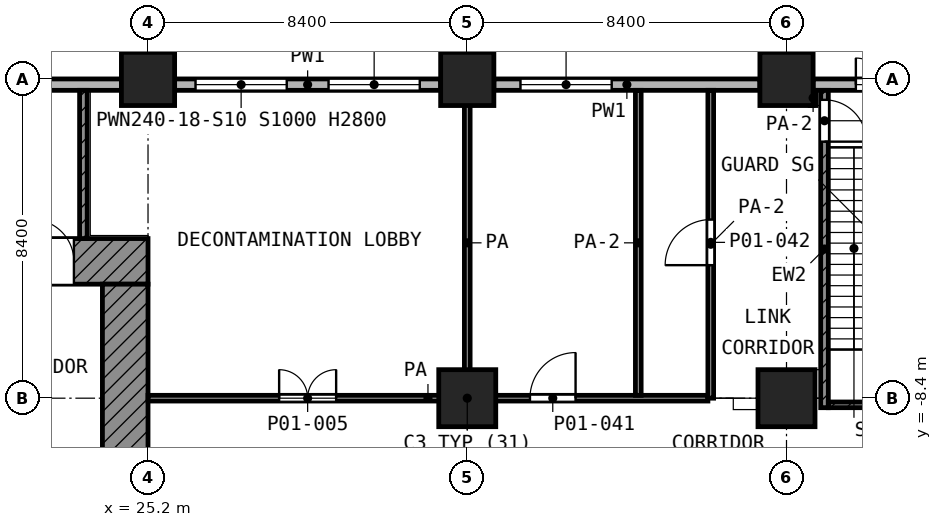
"""IFC4 building model, lengths in metres.
Left out: names, types, materials, properties, quantities, classifications, styles, units other than length and angle.
Written with IfcOpenShell. Run it as: python <this file> out.ifc"""

import sys

from ifc_helpers import new_model, si_unit, direction, frame, frame_2d, origin, origin_2d, place, context, subcontext, project, spatial, rectangle, extrude, element, fill, save


model = new_model("IFC4")
c1 = context("Model", 3, precision=1e-05, world=origin(), true_north=direction((0.0, 1.0)))
c2 = subcontext(c1, "Body", "Model", "MODEL_VIEW")
j1 = project(units=[si_unit("LENGTHUNIT", "METRE"), si_unit("PLANEANGLEUNIT", "RADIAN")], contexts=[c1])
p1 = place(None, origin())
s1 = spatial("IfcSite", under=j1, at=p1, CompositionType="ELEMENT")
p2 = place(p1, origin())
s2 = spatial("IfcBuilding", under=s1, at=p2, CompositionType="ELEMENT")
p3 = place(p2, origin())
s3 = spatial("IfcBuildingStorey", under=s2, at=p3, CompositionType="ELEMENT", Elevation=0.0)
for number, where, z_axis, x_axis in (
    (1, (25.2, 0.0, 0.0), (0.0, 0.0, 1.0), (1.0, 0.0, 0.0)),
    (2, (33.6, 0.0, 0.0), (0.0, 0.0, 1.0), (1.0, 0.0, 0.0)),
    (3, (42.0, 0.0, 0.0), (0.0, 0.0, 1.0), (1.0, 0.0, 0.0)),
):
    element("IfcColumn", number, at=place(p3, frame(where, z_axis=z_axis, x_axis=x_axis)), inside=s3, PredefinedType="COLUMN", context=c2, shape_type="SweptSolid", body=[
        extrude(rectangle(XDim=1.4, YDim=1.4, at=origin_2d()), origin(), (0.0, 0.0, 1.0), 7.0),
    ])
for number, where, z_axis, x_axis in (
    (4, (33.6, -8.4, 0.0), (0.0, 0.0, 1.0), (1.0, 0.0, 0.0)),
    (5, (42.0, -8.4, 0.0), (0.0, 0.0, 1.0), (1.0, 0.0, 0.0)),
):
    element("IfcColumn", number, at=place(p3, frame(where, z_axis=z_axis, x_axis=x_axis)), inside=s3, PredefinedType="COLUMN", context=c2, shape_type="SweptSolid", body=[
        extrude(rectangle(XDim=1.5, YDim=1.5, at=origin_2d()), origin(), (0.0, 0.0, 1.0), 7.0),
    ])
p4 = place(p3, frame((49.7, -0.15, 0.0), z_axis=(0.0, 0.0, 1.0), x_axis=(-1.0, 0.0, 0.0)))
e6 = element("IfcWall", 6, at=p4, inside=s3, PredefinedType="SOLIDWALL", context=c2, shape_type="SweptSolid", body=[
    extrude(rectangle(XDim=7.0, YDim=0.3, at=frame_2d((3.5, 0.0))), origin(), (0.0, 0.0, 1.0), 5.25),
])
p5 = place(p4, frame((4.475, 0.0, 0.0)))
e7 = element("IfcOpeningElement", 7, at=p5, cuts=e6, PredefinedType="OPENING", context=c2, shape_type="SweptSolid", body=[
    extrude(rectangle(XDim=1.4, YDim=2.1, at=frame_2d((0.7, 1.05))), frame((0.0, 0.16, 0.0), z_axis=(0.0, -1.0, 0.0), x_axis=(1.0, 0.0, 0.0)), (0.0, 0.0, 1.0), 0.32),
])
p6 = place(p3, frame((41.3, -0.15, 0.0), z_axis=(0.0, 0.0, 1.0), x_axis=(-1.0, 0.0, 0.0)))
e8 = element("IfcWall", 8, at=p6, inside=s3, PredefinedType="SOLIDWALL", context=c2, shape_type="SweptSolid", body=[
    extrude(rectangle(XDim=7.0, YDim=0.3, at=frame_2d((3.5, 0.0))), origin(), (0.0, 0.0, 1.0), 5.25),
])
p7 = place(p6, frame((3.9, 0.0, 1.0)))
e9 = element("IfcOpeningElement", 9, at=p7, cuts=e8, PredefinedType="OPENING", context=c2, shape_type="SweptSolid", body=[
    extrude(rectangle(XDim=2.4, YDim=1.8, at=frame_2d((1.2, 0.9))), frame((0.0, 0.16, 0.0), z_axis=(0.0, -1.0, 0.0), x_axis=(1.0, 0.0, 0.0)), (0.0, 0.0, 1.0), 0.32),
])
p8 = place(p3, frame((32.9, -0.15, 0.0), z_axis=(0.0, 0.0, 1.0), x_axis=(-1.0, 0.0, 0.0)))
e10 = element("IfcWall", 10, at=p8, inside=s3, PredefinedType="SOLIDWALL", context=c2, shape_type="SweptSolid", body=[
    extrude(rectangle(XDim=7.0, YDim=0.3, at=frame_2d((3.5, 0.0))), origin(), (0.0, 0.0, 1.0), 5.25),
])
p9 = place(p8, frame((0.55, 0.0, 1.0)))
e11 = element("IfcOpeningElement", 11, at=p9, cuts=e10, PredefinedType="OPENING", context=c2, shape_type="SweptSolid", body=[
    extrude(rectangle(XDim=2.4, YDim=1.8, at=frame_2d((1.2, 0.9))), frame((0.0, 0.16, 0.0), z_axis=(0.0, -1.0, 0.0), x_axis=(1.0, 0.0, 0.0)), (0.0, 0.0, 1.0), 0.32),
])
p10 = place(p8, frame((4.05, 0.0, 1.0)))
e12 = element("IfcOpeningElement", 12, at=p10, cuts=e10, PredefinedType="OPENING", context=c2, shape_type="SweptSolid", body=[
    extrude(rectangle(XDim=2.4, YDim=1.8, at=frame_2d((1.2, 0.9))), frame((0.0, 0.16, 0.0), z_axis=(0.0, -1.0, 0.0), x_axis=(1.0, 0.0, 0.0)), (0.0, 0.0, 1.0), 0.32),
])
p11 = place(p3, frame((24.5, -0.15, 0.0), z_axis=(0.0, 0.0, 1.0), x_axis=(-1.0, 0.0, 0.0)))
e13 = element("IfcWall", 13, at=p11, inside=s3, PredefinedType="SOLIDWALL", context=c2, shape_type="SweptSolid", body=[
    extrude(rectangle(XDim=7.0, YDim=0.3, at=frame_2d((3.5, 0.0))), origin(), (0.0, 0.0, 1.0), 5.25),
])
p12 = place(p11, frame((4.425, 0.0, 0.0)))
e14 = element("IfcOpeningElement", 14, at=p12, cuts=e13, PredefinedType="OPENING", context=c2, shape_type="SweptSolid", body=[
    extrude(rectangle(XDim=1.4, YDim=2.1, at=frame_2d((0.7, 1.05))), frame((0.0, 0.16, 0.0), z_axis=(0.0, -1.0, 0.0), x_axis=(1.0, 0.0, 0.0)), (0.0, 0.0, 1.0), 0.32),
])
p13 = place(p3, frame((4.2, -4.8, 0.0), z_axis=(0.0, 0.0, 1.0), x_axis=(1.0, 0.0, 0.0)))
e15 = element("IfcWall", 15, at=p13, inside=s3, PredefinedType="SHEAR", context=c2, shape_type="SweptSolid", body=[
    extrude(rectangle(XDim=21.0, YDim=1.2, at=frame_2d((10.5, 0.0))), origin(), (0.0, 0.0, 1.0), 6.65),
])
p14 = place(p13, frame((1.95, 0.0, 0.0)))
e16 = element("IfcOpeningElement", 16, at=p14, cuts=e15, PredefinedType="OPENING", context=c2, shape_type="SweptSolid", body=[
    extrude(rectangle(XDim=1.1, YDim=2.1, at=frame_2d((0.55, 1.05))), frame((0.0, 0.61, 0.0), z_axis=(0.0, -1.0, 0.0), x_axis=(1.0, 0.0, 0.0)), (0.0, 0.0, 1.0), 1.22),
])
p15 = place(p13, frame((17.95, 0.0, 0.0)))
e17 = element("IfcOpeningElement", 17, at=p15, cuts=e15, PredefinedType="OPENING", context=c2, shape_type="SweptSolid", body=[
    extrude(rectangle(XDim=1.1, YDim=2.1, at=frame_2d((0.55, 1.05))), frame((0.0, 0.61, 0.0), z_axis=(0.0, -1.0, 0.0), x_axis=(1.0, 0.0, 0.0)), (0.0, 0.0, 1.0), 1.22),
])
p16 = place(p3, frame((24.6, -24.0, 0.0), z_axis=(0.0, 0.0, 1.0), x_axis=(0.0, 1.0, 0.0)))
e18 = element("IfcWall", 18, at=p16, inside=s3, PredefinedType="SHEAR", context=c2, shape_type="SweptSolid", body=[
    extrude(rectangle(XDim=18.6, YDim=1.2, at=frame_2d((9.3, 0.0))), origin(), (0.0, 0.0, 1.0), 6.65),
])
p17 = place(p16, frame((10.5, 0.0, 0.0)))
e19 = element("IfcOpeningElement", 19, at=p17, cuts=e18, PredefinedType="OPENING", context=c2, shape_type="SweptSolid", body=[
    extrude(rectangle(XDim=1.8, YDim=2.1, at=frame_2d((0.9, 1.05))), frame((0.0, 0.61, 0.0), z_axis=(0.0, -1.0, 0.0), x_axis=(1.0, 0.0, 0.0)), (0.0, 0.0, 1.0), 1.22),
])
p18 = place(p3, frame((23.5, -4.2, 0.0), z_axis=(0.0, 0.0, 1.0), x_axis=(0.0, 1.0, 0.0)))
e20 = element("IfcWall", 20, at=p18, inside=s3, PredefinedType="SHEAR", context=c2, shape_type="SweptSolid", body=[
    extrude(rectangle(XDim=3.9, YDim=0.2, at=frame_2d((1.95, 0.0))), origin(), (0.0, 0.0, 1.0), 6.65),
])
p19 = place(p3, frame((43.0, -8.65, 0.0), z_axis=(0.0, 0.0, 1.0), x_axis=(0.0, 1.0, 0.0)))
e21 = element("IfcWall", 21, at=p19, inside=s3, PredefinedType="SHEAR", context=c2, shape_type="SweptSolid", body=[
    extrude(rectangle(XDim=8.35, YDim=0.2, at=frame_2d((4.175, 0.0))), origin(), (0.0, 0.0, 1.0), 6.65),
])
p20 = place(p19, frame((7.0, 0.0, 0.0)))
e22 = element("IfcOpeningElement", 22, at=p20, cuts=e21, PredefinedType="OPENING", context=c2, shape_type="SweptSolid", body=[
    extrude(rectangle(XDim=1.1, YDim=2.1, at=frame_2d((0.55, 1.05))), frame((0.0, 0.11, 0.0), z_axis=(0.0, -1.0, 0.0), x_axis=(1.0, 0.0, 0.0)), (0.0, 0.0, 1.0), 0.22),
])
p21 = place(p3, frame((43.1, -8.575, 0.0), z_axis=(0.0, 0.0, 1.0), x_axis=(1.0, 0.0, 0.0)))
e23 = element("IfcWall", 23, at=p21, inside=s3, PredefinedType="SHEAR", context=c2, shape_type="SweptSolid", body=[
    extrude(rectangle(XDim=2.85, YDim=0.15, at=frame_2d((1.425, 0.0))), origin(), (0.0, 0.0, 1.0), 6.65),
])
p22 = place(p3, frame((25.2, -8.4, 0.0), z_axis=(0.0, 0.0, 1.0), x_axis=(1.0, 0.0, 0.0)))
e24 = element("IfcWall", 24, at=p22, inside=s3, PredefinedType="PARTITIONING", context=c2, shape_type="SweptSolid", body=[
    extrude(rectangle(XDim=14.732, YDim=0.15, at=frame_2d((7.366, 0.0))), origin(), (0.0, 0.0, 1.0), 6.65),
])
p23 = place(p22, frame((3.45, 0.0, 0.0)))
e25 = element("IfcOpeningElement", 25, at=p23, cuts=e24, PredefinedType="OPENING", context=c2, shape_type="SweptSolid", body=[
    extrude(rectangle(XDim=1.5, YDim=2.1, at=frame_2d((0.75, 1.05))), frame((0.0, 0.085, 0.0), z_axis=(0.0, -1.0, 0.0), x_axis=(1.0, 0.0, 0.0)), (0.0, 0.0, 1.0), 0.17),
])
p24 = place(p22, frame((10.05, 0.0, 0.0)))
e26 = element("IfcOpeningElement", 26, at=p24, cuts=e24, PredefinedType="OPENING", context=c2, shape_type="SweptSolid", body=[
    extrude(rectangle(XDim=1.2, YDim=2.1, at=frame_2d((0.6, 1.05))), frame((0.0, 0.085, 0.0), z_axis=(0.0, -1.0, 0.0), x_axis=(1.0, 0.0, 0.0)), (0.0, 0.0, 1.0), 0.17),
])
p25 = place(p3, frame((33.6, -8.325, 0.0), z_axis=(0.0, 0.0, 1.0), x_axis=(0.0, 1.0, 0.0)))
e27 = element("IfcWall", 27, at=p25, inside=s3, PredefinedType="PARTITIONING", context=c2, shape_type="SweptSolid", body=[
    extrude(rectangle(XDim=8.025, YDim=0.15, at=frame_2d((4.012, 0.0))), origin(), (0.0, 0.0, 1.0), 6.65),
])
p26 = place(p3, frame((38.1, -8.325, 0.0), z_axis=(0.0, 0.0, 1.0), x_axis=(0.0, 1.0, 0.0)))
e28 = element("IfcWall", 28, at=p26, inside=s3, PredefinedType="PARTITIONING", context=c2, shape_type="SweptSolid", body=[
    extrude(rectangle(XDim=8.025, YDim=0.15, at=frame_2d((4.012, 0.0))), origin(), (0.0, 0.0, 1.0), 5.25),
])
p27 = place(p3, frame((40.007, -8.4, 0.0), z_axis=(0.0, 0.0, 1.0), x_axis=(0.0, 1.0, 0.0)))
e29 = element("IfcWall", 29, at=p27, inside=s3, PredefinedType="PARTITIONING", context=c2, shape_type="SweptSolid", body=[
    extrude(rectangle(XDim=8.1, YDim=0.15, at=frame_2d((4.05, 0.0))), origin(), (0.0, 0.0, 1.0), 5.25),
])
p28 = place(p27, frame((3.5, 0.0, 0.0)))
e30 = element("IfcOpeningElement", 30, at=p28, cuts=e29, PredefinedType="OPENING", context=c2, shape_type="SweptSolid", body=[
    extrude(rectangle(XDim=1.2, YDim=2.1, at=frame_2d((0.6, 1.05))), frame((0.0, 0.085, 0.0), z_axis=(0.0, -1.0, 0.0), x_axis=(1.0, 0.0, 0.0)), (0.0, 0.0, 1.0), 0.17),
])
p29 = place(p3, frame((42.7, -0.7, 0.0), z_axis=(0.0, 0.0, 1.0), x_axis=(0.0, 1.0, 0.0)))
e31 = element("IfcWall", 31, at=p29, inside=s3, PredefinedType="PARTITIONING", context=c2, shape_type="SweptSolid", body=[
    extrude(rectangle(XDim=0.4, YDim=0.15, at=frame_2d((0.2, 0.0))), origin(), (0.0, 0.0, 1.0), 5.25),
])
p30 = place(p5, frame((1.4, 0.0, 0.0), z_axis=(0.0, 0.0, 1.0), x_axis=(-1.0, 0.0, 0.0)))
e32 = element("IfcDoor", 32, at=p30, inside=s3, OperationType="DOUBLE_DOOR_SINGLE_SWING", PredefinedType="DOOR", context=c2, shape_type="SweptSolid", body=[
    extrude(rectangle(XDim=1.4, YDim=2.1, at=frame_2d((0.7, 1.05))), frame((0.0, 0.025, 0.0), z_axis=(0.0, -1.0, 0.0), x_axis=(1.0, 0.0, 0.0)), (0.0, 0.0, 1.0), 0.05),
])
fill(e7, e32)
p31 = place(p7, origin())
e33 = element("IfcWindow", 33, at=p31, inside=s3, PartitioningType="SINGLE_PANEL", PredefinedType="WINDOW", context=c2, shape_type="SweptSolid", body=[
    extrude(rectangle(XDim=2.4, YDim=1.8, at=frame_2d((1.2, 0.9))), frame((0.0, 0.03, 0.0), z_axis=(0.0, -1.0, 0.0), x_axis=(1.0, 0.0, 0.0)), (0.0, 0.0, 1.0), 0.06),
])
fill(e9, e33)
p32 = place(p9, origin())
e34 = element("IfcWindow", 34, at=p32, inside=s3, PartitioningType="SINGLE_PANEL", PredefinedType="WINDOW", context=c2, shape_type="SweptSolid", body=[
    extrude(rectangle(XDim=2.4, YDim=1.8, at=frame_2d((1.2, 0.9))), frame((0.0, 0.03, 0.0), z_axis=(0.0, -1.0, 0.0), x_axis=(1.0, 0.0, 0.0)), (0.0, 0.0, 1.0), 0.06),
])
fill(e11, e34)
p33 = place(p10, origin())
e35 = element("IfcWindow", 35, at=p33, inside=s3, PartitioningType="SINGLE_PANEL", PredefinedType="WINDOW", context=c2, shape_type="SweptSolid", body=[
    extrude(rectangle(XDim=2.4, YDim=1.8, at=frame_2d((1.2, 0.9))), frame((0.0, 0.03, 0.0), z_axis=(0.0, -1.0, 0.0), x_axis=(1.0, 0.0, 0.0)), (0.0, 0.0, 1.0), 0.06),
])
fill(e12, e35)
p34 = place(p15, origin())
e36 = element("IfcDoor", 36, at=p34, inside=s3, OperationType="SINGLE_SWING_LEFT", PredefinedType="DOOR", context=c2, shape_type="SweptSolid", body=[
    extrude(rectangle(XDim=1.1, YDim=2.1, at=frame_2d((0.55, 1.05))), frame((0.0, 0.025, 0.0), z_axis=(0.0, -1.0, 0.0), x_axis=(1.0, 0.0, 0.0)), (0.0, 0.0, 1.0), 0.05),
])
fill(e17, e36)
p35 = place(p20, frame((1.1, 0.0, 0.0), z_axis=(0.0, 0.0, 1.0), x_axis=(-1.0, 0.0, 0.0)))
e37 = element("IfcDoor", 37, at=p35, inside=s3, OperationType="SINGLE_SWING_LEFT", PredefinedType="DOOR", context=c2, shape_type="SweptSolid", body=[
    extrude(rectangle(XDim=1.1, YDim=2.1, at=frame_2d((0.55, 1.05))), frame((0.0, 0.025, 0.0), z_axis=(0.0, -1.0, 0.0), x_axis=(1.0, 0.0, 0.0)), (0.0, 0.0, 1.0), 0.05),
])
fill(e22, e37)
p36 = place(p23, origin())
e38 = element("IfcDoor", 38, at=p36, inside=s3, OperationType="DOUBLE_DOOR_SINGLE_SWING", PredefinedType="DOOR", context=c2, shape_type="SweptSolid", body=[
    extrude(rectangle(XDim=1.5, YDim=2.1, at=frame_2d((0.75, 1.05))), frame((0.0, 0.025, 0.0), z_axis=(0.0, -1.0, 0.0), x_axis=(1.0, 0.0, 0.0)), (0.0, 0.0, 1.0), 0.05),
])
fill(e25, e38)
p37 = place(p24, origin())
e39 = element("IfcDoor", 39, at=p37, inside=s3, OperationType="SINGLE_SWING_RIGHT", PredefinedType="DOOR", context=c2, shape_type="SweptSolid", body=[
    extrude(rectangle(XDim=1.2, YDim=2.1, at=frame_2d((0.6, 1.05))), frame((0.0, 0.025, 0.0), z_axis=(0.0, -1.0, 0.0), x_axis=(1.0, 0.0, 0.0)), (0.0, 0.0, 1.0), 0.05),
])
fill(e26, e39)
p38 = place(p28, origin())
e40 = element("IfcDoor", 40, at=p38, inside=s3, OperationType="SINGLE_SWING_LEFT", PredefinedType="DOOR", context=c2, shape_type="SweptSolid", body=[
    extrude(rectangle(XDim=1.2, YDim=2.1, at=frame_2d((0.6, 1.05))), frame((0.0, 0.025, 0.0), z_axis=(0.0, -1.0, 0.0), x_axis=(1.0, 0.0, 0.0)), (0.0, 0.0, 1.0), 0.05),
])
fill(e30, e40)
save(model, sys.argv[1])
